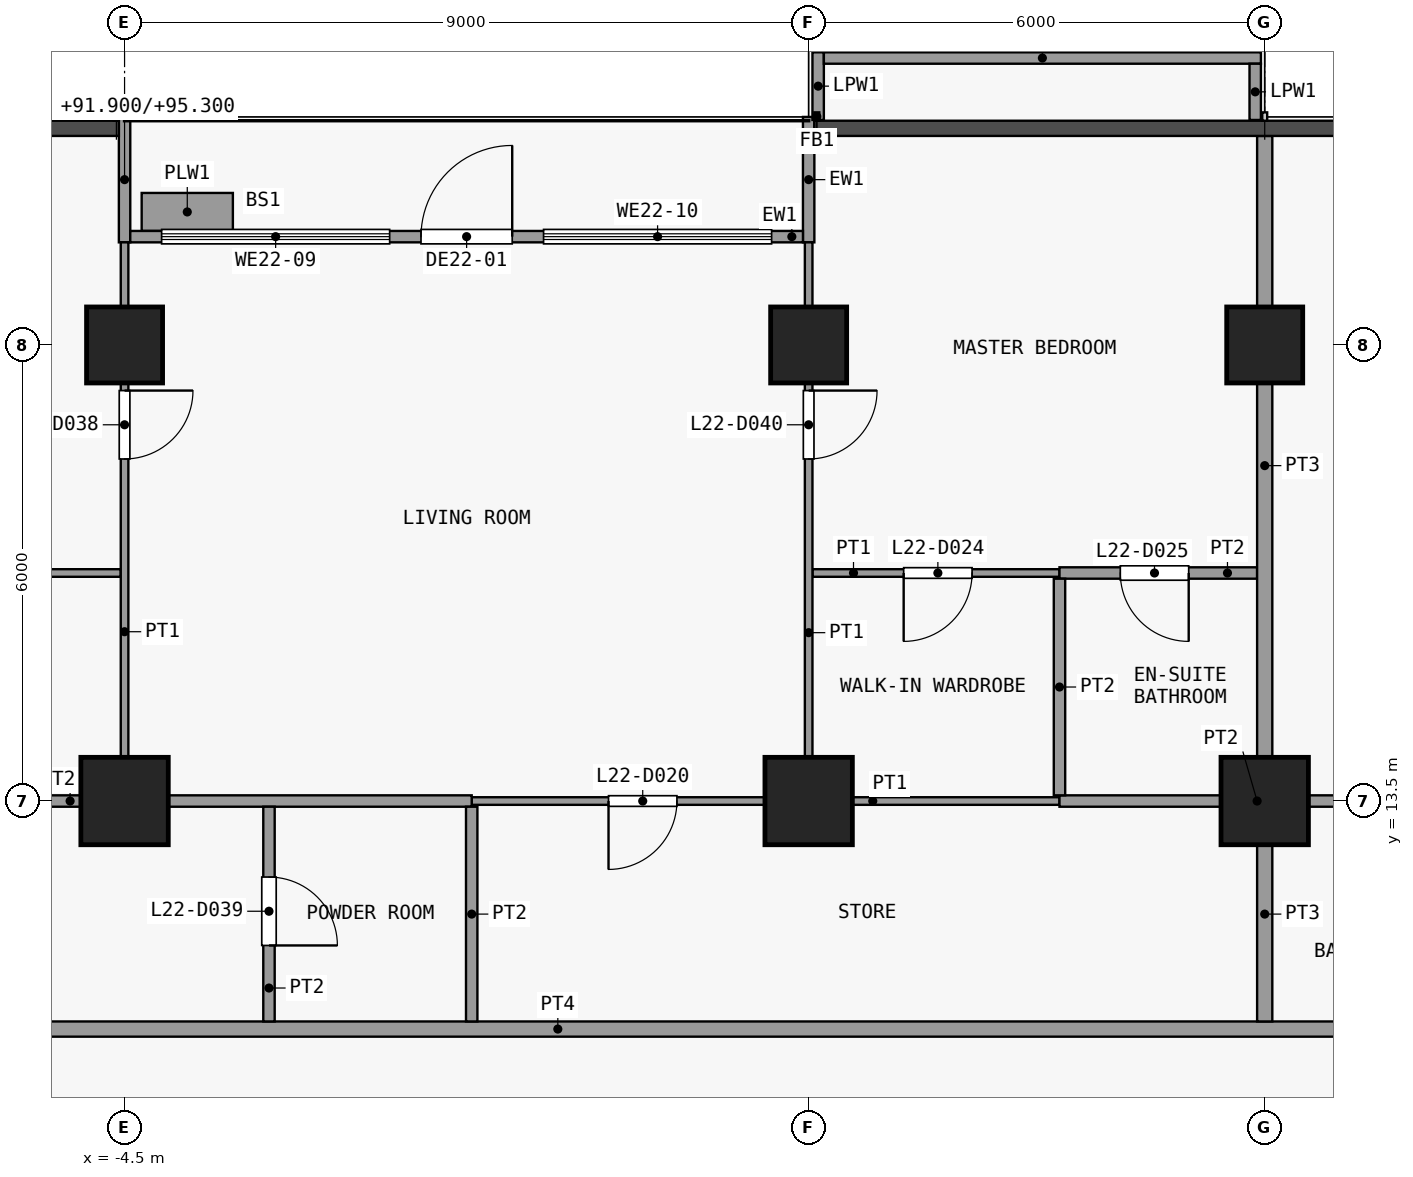
"""IFC4 building model, lengths in metres.
Left out: names, types, materials, properties, quantities, classifications, styles, units other than length and angle.
Written with IfcOpenShell. Run it as: python <this file> out.ifc"""

import sys

from ifc_helpers import new_model, si_unit, direction, frame, frame_2d, origin, origin_2d, place, context, subcontext, project, spatial, rectangle, extrude, element, fill, save


model = new_model("IFC4")
c1 = context("Model", 3, precision=1e-05, world=origin(), true_north=direction((0.0, 1.0)))
c2 = subcontext(c1, "Body", "Model", "MODEL_VIEW")
j1 = project(units=[si_unit("LENGTHUNIT", "METRE"), si_unit("PLANEANGLEUNIT", "RADIAN")], contexts=[c1])
p1 = place(None, origin())
s1 = spatial("IfcSite", under=j1, at=p1, CompositionType="ELEMENT")
p2 = place(p1, origin())
s2 = spatial("IfcBuilding", under=s1, at=p2, CompositionType="ELEMENT")
p3 = place(p2, frame((0.0, 0.0, 91.9)))
s3 = spatial("IfcBuildingStorey", under=s2, at=p3, CompositionType="ELEMENT", Elevation=91.9)
p4 = place(p3, frame((-4.5, 13.5, 0.0), z_axis=(0.0, 0.0, 1.0), x_axis=(1.0, 0.0, 0.0)))
e1 = element("IfcColumn", 1, at=p4, inside=s3, PredefinedType="COLUMN", context=c2, shape_type="SweptSolid", body=[
    extrude(rectangle(XDim=1.15, YDim=1.15, at=origin_2d()), origin(), (0.0, 0.0, 1.0), 3.6),
])
p5 = place(p3, frame((-4.5, 19.5, 0.0), z_axis=(0.0, 0.0, 1.0), x_axis=(1.0, 0.0, 0.0)))
e2 = element("IfcColumn", 2, at=p5, inside=s3, PredefinedType="COLUMN", context=c2, shape_type="SweptSolid", body=[
    extrude(rectangle(XDim=1.0, YDim=1.0, at=origin_2d()), origin(), (0.0, 0.0, 1.0), 3.6),
])
p6 = place(p3, frame((4.5, 13.5, 0.0), z_axis=(0.0, 0.0, 1.0), x_axis=(1.0, 0.0, 0.0)))
e3 = element("IfcColumn", 3, at=p6, inside=s3, PredefinedType="COLUMN", context=c2, shape_type="SweptSolid", body=[
    extrude(rectangle(XDim=1.15, YDim=1.15, at=origin_2d()), origin(), (0.0, 0.0, 1.0), 3.6),
])
p7 = place(p3, frame((4.5, 19.5, 0.0), z_axis=(0.0, 0.0, 1.0), x_axis=(1.0, 0.0, 0.0)))
e4 = element("IfcColumn", 4, at=p7, inside=s3, PredefinedType="COLUMN", context=c2, shape_type="SweptSolid", body=[
    extrude(rectangle(XDim=1.0, YDim=1.0, at=origin_2d()), origin(), (0.0, 0.0, 1.0), 3.6),
])
p8 = place(p3, frame((10.5, 13.5, 0.0), z_axis=(0.0, 0.0, 1.0), x_axis=(1.0, 0.0, 0.0)))
e5 = element("IfcColumn", 5, at=p8, inside=s3, PredefinedType="COLUMN", context=c2, shape_type="SweptSolid", body=[
    extrude(rectangle(XDim=1.15, YDim=1.15, at=origin_2d()), origin(), (0.0, 0.0, 1.0), 3.6),
])
p9 = place(p3, frame((10.5, 19.5, 0.0), z_axis=(0.0, 0.0, 1.0), x_axis=(1.0, 0.0, 0.0)))
e6 = element("IfcColumn", 6, at=p9, inside=s3, PredefinedType="COLUMN", context=c2, shape_type="SweptSolid", body=[
    extrude(rectangle(XDim=1.0, YDim=1.0, at=origin_2d()), origin(), (0.0, 0.0, 1.0), 3.6),
])
p10 = place(p3, frame((-4.5, 20.85, 0.0), z_axis=(0.0, 0.0, 1.0), x_axis=(0.0, 1.0, 0.0)))
e7 = element("IfcWall", 7, at=p10, inside=s3, PredefinedType="SOLIDWALL", context=c2, shape_type="SweptSolid", body=[
    extrude(rectangle(XDim=1.65, YDim=0.15, at=frame_2d((0.825, 0.0))), origin(), (0.0, 0.0, 1.0), 3.4),
])
p11 = place(p3, frame((4.5, 20.85, 0.0), z_axis=(0.0, 0.0, 1.0), x_axis=(0.0, 1.0, 0.0)))
e8 = element("IfcWall", 8, at=p11, inside=s3, PredefinedType="SOLIDWALL", context=c2, shape_type="SweptSolid", body=[
    extrude(rectangle(XDim=1.65, YDim=0.15, at=frame_2d((0.825, 0.0))), origin(), (0.0, 0.0, 1.0), 3.3),
])
p12 = place(p3, frame((-4.425, 20.925, 0.0), z_axis=(0.0, 0.0, 1.0), x_axis=(1.0, 0.0, 0.0)))
e9 = element("IfcWall", 9, at=p12, inside=s3, PredefinedType="SOLIDWALL", context=c2, shape_type="SweptSolid", body=[
    extrude(rectangle(XDim=8.85, YDim=0.15, at=frame_2d((4.425, 0.0))), origin(), (0.0, 0.0, 1.0), 3.3),
])
p13 = place(p12, frame((3.825, 0.0, 0.0)))
e10 = element("IfcOpeningElement", 10, at=p13, cuts=e9, PredefinedType="OPENING", context=c2, shape_type="SweptSolid", body=[
    extrude(rectangle(XDim=1.2, YDim=2.4, at=frame_2d((0.6, 1.2))), frame((0.0, 0.085, 0.0), z_axis=(0.0, -1.0, 0.0), x_axis=(1.0, 0.0, 0.0)), (0.0, 0.0, 1.0), 0.17),
])
p14 = place(p12, frame((0.413, 0.0, 0.9)))
e11 = element("IfcOpeningElement", 11, at=p14, cuts=e9, PredefinedType="OPENING", context=c2, shape_type="SweptSolid", body=[
    extrude(rectangle(XDim=3.0, YDim=2.1, at=frame_2d((1.5, 1.05))), frame((0.0, 0.085, 0.0), z_axis=(0.0, -1.0, 0.0), x_axis=(1.0, 0.0, 0.0)), (0.0, 0.0, 1.0), 0.17),
])
p15 = place(p12, frame((5.438, 0.0, 0.9)))
e12 = element("IfcOpeningElement", 12, at=p15, cuts=e9, PredefinedType="OPENING", context=c2, shape_type="SweptSolid", body=[
    extrude(rectangle(XDim=3.0, YDim=2.1, at=frame_2d((1.5, 1.05))), frame((0.0, 0.085, 0.0), z_axis=(0.0, -1.0, 0.0), x_axis=(1.0, 0.0, 0.0)), (0.0, 0.0, 1.0), 0.17),
])
p16 = place(p3, frame((-4.275, 21.25, 0.0), z_axis=(0.0, 0.0, 1.0), x_axis=(1.0, 0.0, 0.0)))
e13 = element("IfcWall", 13, at=p16, inside=s3, PredefinedType="USERDEFINED", context=c2, shape_type="SweptSolid", body=[
    extrude(rectangle(XDim=1.2, YDim=0.5, at=frame_2d((0.6, 0.0))), origin(), (0.0, 0.0, 1.0), 0.9),
])
p17 = place(p3, frame((4.625, 22.46, 0.0), z_axis=(0.0, 0.0, 1.0), x_axis=(0.0, 1.0, 0.0)))
e14 = element("IfcWall", 14, at=p17, inside=s3, PredefinedType="PARAPET", context=c2, shape_type="SweptSolid", body=[
    extrude(rectangle(XDim=0.89, YDim=0.15, at=frame_2d((0.445, 0.0))), origin(), (0.0, 0.0, 1.0), 1.15),
])
p18 = place(p3, frame((4.7, 23.275, 0.0), z_axis=(0.0, 0.0, 1.0), x_axis=(1.0, 0.0, 0.0)))
e15 = element("IfcWall", 15, at=p18, inside=s3, PredefinedType="PARAPET", context=c2, shape_type="SweptSolid", body=[
    extrude(rectangle(XDim=5.75, YDim=0.15, at=frame_2d((2.875, 0.0))), origin(), (0.0, 0.0, 1.0), 1.15),
])
p19 = place(p3, frame((10.375, 23.2, 0.0), z_axis=(0.0, 0.0, 1.0), x_axis=(0.0, -1.0, 0.0)))
e16 = element("IfcWall", 16, at=p19, inside=s3, PredefinedType="PARAPET", context=c2, shape_type="SweptSolid", body=[
    extrude(rectangle(XDim=0.74, YDim=0.15, at=frame_2d((0.37, 0.0))), origin(), (0.0, 0.0, 1.0), 1.15),
])
p20 = place(p3, frame((-26.25, 10.5, 0.0), z_axis=(0.0, 0.0, 1.0), x_axis=(1.0, 0.0, 0.0)))
e17 = element("IfcWall", 17, at=p20, inside=s3, PredefinedType="PARTITIONING", context=c2, shape_type="SweptSolid", body=[
    extrude(rectangle(XDim=50.1, YDim=0.2, at=frame_2d((25.05, 0.0))), origin(), (0.0, 0.0, 1.0), 3.3),
])
p21 = place(p20, frame((5.45, 0.0, 0.0)))
e18 = element("IfcOpeningElement", 18, at=p21, cuts=e17, PredefinedType="OPENING", context=c2, shape_type="SweptSolid", body=[
    extrude(rectangle(XDim=1.0, YDim=2.1, at=frame_2d((0.5, 1.05))), frame((0.0, 0.11, 0.0), z_axis=(0.0, -1.0, 0.0), x_axis=(1.0, 0.0, 0.0)), (0.0, 0.0, 1.0), 0.22),
])
p22 = place(p20, frame((13.95, 0.0, 0.0)))
e19 = element("IfcOpeningElement", 19, at=p22, cuts=e17, PredefinedType="OPENING", context=c2, shape_type="SweptSolid", body=[
    extrude(rectangle(XDim=1.0, YDim=2.1, at=frame_2d((0.5, 1.05))), frame((0.0, 0.11, 0.0), z_axis=(0.0, -1.0, 0.0), x_axis=(1.0, 0.0, 0.0)), (0.0, 0.0, 1.0), 0.22),
])
p23 = place(p20, frame((39.95, 0.0, 0.0)))
e20 = element("IfcOpeningElement", 20, at=p23, cuts=e17, PredefinedType="OPENING", context=c2, shape_type="SweptSolid", body=[
    extrude(rectangle(XDim=1.0, YDim=2.1, at=frame_2d((0.5, 1.05))), frame((0.0, 0.11, 0.0), z_axis=(0.0, -1.0, 0.0), x_axis=(1.0, 0.0, 0.0)), (0.0, 0.0, 1.0), 0.22),
])
p24 = place(p3, frame((0.067, 13.5, 0.0), z_axis=(0.0, 0.0, 1.0), x_axis=(1.0, 0.0, 0.0)))
e21 = element("IfcWall", 21, at=p24, inside=s3, PredefinedType="PARTITIONING", context=c2, shape_type="SweptSolid", body=[
    extrude(rectangle(XDim=7.733, YDim=0.1, at=frame_2d((3.867, 0.0))), origin(), (0.0, 0.0, 1.0), 3.3),
])
p25 = place(p24, frame((1.8, 0.0, 0.0)))
e22 = element("IfcOpeningElement", 22, at=p25, cuts=e21, PredefinedType="OPENING", context=c2, shape_type="SweptSolid", body=[
    extrude(rectangle(XDim=0.9, YDim=2.1, at=frame_2d((0.45, 1.05))), frame((0.0, 0.06, 0.0), z_axis=(0.0, -1.0, 0.0), x_axis=(1.0, 0.0, 0.0)), (0.0, 0.0, 1.0), 0.12),
])
p26 = place(p3, frame((-10.5, 13.5, 0.0), z_axis=(0.0, 0.0, 1.0), x_axis=(1.0, 0.0, 0.0)))
e23 = element("IfcWall", 23, at=p26, inside=s3, PredefinedType="PARTITIONING", context=c2, shape_type="SweptSolid", body=[
    extrude(rectangle(XDim=10.567, YDim=0.15, at=frame_2d((5.283, 0.0))), origin(), (0.0, 0.0, 1.0), 3.3),
])
p27 = place(p3, frame((7.8, 13.5, 0.0), z_axis=(0.0, 0.0, 1.0), x_axis=(1.0, 0.0, 0.0)))
e24 = element("IfcWall", 24, at=p27, inside=s3, PredefinedType="PARTITIONING", context=c2, shape_type="SweptSolid", body=[
    extrude(rectangle(XDim=5.2, YDim=0.15, at=frame_2d((2.6, 0.0))), origin(), (0.0, 0.0, 1.0), 3.3),
])
p28 = place(p3, frame((-10.45, 16.5, 0.0), z_axis=(0.0, 0.0, 1.0), x_axis=(1.0, 0.0, 0.0)))
e25 = element("IfcWall", 25, at=p28, inside=s3, PredefinedType="PARTITIONING", context=c2, shape_type="SweptSolid", body=[
    extrude(rectangle(XDim=5.9, YDim=0.1, at=frame_2d((2.95, 0.0))), origin(), (0.0, 0.0, 1.0), 3.3),
])
p29 = place(p28, frame((2.5, 0.0, 0.0)))
e26 = element("IfcOpeningElement", 26, at=p29, cuts=e25, PredefinedType="OPENING", context=c2, shape_type="SweptSolid", body=[
    extrude(rectangle(XDim=0.9, YDim=2.1, at=frame_2d((0.45, 1.05))), frame((0.0, 0.06, 0.0), z_axis=(0.0, -1.0, 0.0), x_axis=(1.0, 0.0, 0.0)), (0.0, 0.0, 1.0), 0.12),
])
p30 = place(p3, frame((4.55, 16.5, 0.0), z_axis=(0.0, 0.0, 1.0), x_axis=(1.0, 0.0, 0.0)))
e27 = element("IfcWall", 27, at=p30, inside=s3, PredefinedType="PARTITIONING", context=c2, shape_type="SweptSolid", body=[
    extrude(rectangle(XDim=3.25, YDim=0.1, at=frame_2d((1.625, 0.0))), origin(), (0.0, 0.0, 1.0), 3.3),
])
p31 = place(p30, frame((1.2, 0.0, 0.0)))
e28 = element("IfcOpeningElement", 28, at=p31, cuts=e27, PredefinedType="OPENING", context=c2, shape_type="SweptSolid", body=[
    extrude(rectangle(XDim=0.9, YDim=2.1, at=frame_2d((0.45, 1.05))), frame((0.0, 0.06, 0.0), z_axis=(0.0, -1.0, 0.0), x_axis=(1.0, 0.0, 0.0)), (0.0, 0.0, 1.0), 0.12),
])
p32 = place(p3, frame((7.8, 16.5, 0.0), z_axis=(0.0, 0.0, 1.0), x_axis=(1.0, 0.0, 0.0)))
e29 = element("IfcWall", 29, at=p32, inside=s3, PredefinedType="PARTITIONING", context=c2, shape_type="SweptSolid", body=[
    extrude(rectangle(XDim=2.6, YDim=0.15, at=frame_2d((1.3, 0.0))), origin(), (0.0, 0.0, 1.0), 3.3),
])
p33 = place(p32, frame((0.8, 0.0, 0.0)))
e30 = element("IfcOpeningElement", 30, at=p33, cuts=e29, PredefinedType="OPENING", context=c2, shape_type="SweptSolid", body=[
    extrude(rectangle(XDim=0.9, YDim=2.1, at=frame_2d((0.45, 1.05))), frame((0.0, 0.085, 0.0), z_axis=(0.0, -1.0, 0.0), x_axis=(1.0, 0.0, 0.0)), (0.0, 0.0, 1.0), 0.17),
])
p34 = place(p3, frame((-4.5, 13.575, 0.0), z_axis=(0.0, 0.0, 1.0), x_axis=(0.0, 1.0, 0.0)))
e31 = element("IfcWall", 31, at=p34, inside=s3, PredefinedType="PARTITIONING", context=c2, shape_type="SweptSolid", body=[
    extrude(rectangle(XDim=7.275, YDim=0.1, at=frame_2d((3.638, 0.0))), origin(), (0.0, 0.0, 1.0), 3.3),
])
p35 = place(p34, frame((4.425, 0.0, 0.0)))
e32 = element("IfcOpeningElement", 32, at=p35, cuts=e31, PredefinedType="OPENING", context=c2, shape_type="SweptSolid", body=[
    extrude(rectangle(XDim=0.9, YDim=2.1, at=frame_2d((0.45, 1.05))), frame((0.0, 0.06, 0.0), z_axis=(0.0, -1.0, 0.0), x_axis=(1.0, 0.0, 0.0)), (0.0, 0.0, 1.0), 0.12),
])
p36 = place(p3, frame((-2.6, 10.6, 0.0), z_axis=(0.0, 0.0, 1.0), x_axis=(0.0, 1.0, 0.0)))
e33 = element("IfcWall", 33, at=p36, inside=s3, PredefinedType="PARTITIONING", context=c2, shape_type="SweptSolid", body=[
    extrude(rectangle(XDim=2.825, YDim=0.15, at=frame_2d((1.413, 0.0))), origin(), (0.0, 0.0, 1.0), 3.3),
])
p37 = place(p36, frame((1.0, 0.0, 0.0)))
e34 = element("IfcOpeningElement", 34, at=p37, cuts=e33, PredefinedType="OPENING", context=c2, shape_type="SweptSolid", body=[
    extrude(rectangle(XDim=0.9, YDim=2.1, at=frame_2d((0.45, 1.05))), frame((0.0, 0.085, 0.0), z_axis=(0.0, -1.0, 0.0), x_axis=(1.0, 0.0, 0.0)), (0.0, 0.0, 1.0), 0.17),
])
p38 = place(p3, frame((0.067, 10.6, 0.0), z_axis=(0.0, 0.0, 1.0), x_axis=(0.0, 1.0, 0.0)))
e35 = element("IfcWall", 35, at=p38, inside=s3, PredefinedType="PARTITIONING", context=c2, shape_type="SweptSolid", body=[
    extrude(rectangle(XDim=2.825, YDim=0.15, at=frame_2d((1.413, 0.0))), origin(), (0.0, 0.0, 1.0), 3.3),
])
p39 = place(p3, frame((4.5, 13.55, 0.0), z_axis=(0.0, 0.0, 1.0), x_axis=(0.0, 1.0, 0.0)))
e36 = element("IfcWall", 36, at=p39, inside=s3, PredefinedType="PARTITIONING", context=c2, shape_type="SweptSolid", body=[
    extrude(rectangle(XDim=7.3, YDim=0.1, at=frame_2d((3.65, 0.0))), origin(), (0.0, 0.0, 1.0), 3.3),
])
p40 = place(p39, frame((4.45, 0.0, 0.0)))
e37 = element("IfcOpeningElement", 37, at=p40, cuts=e36, PredefinedType="OPENING", context=c2, shape_type="SweptSolid", body=[
    extrude(rectangle(XDim=0.9, YDim=2.1, at=frame_2d((0.45, 1.05))), frame((0.0, 0.06, 0.0), z_axis=(0.0, -1.0, 0.0), x_axis=(1.0, 0.0, 0.0)), (0.0, 0.0, 1.0), 0.12),
])
p41 = place(p3, frame((7.8, 13.575, 0.0), z_axis=(0.0, 0.0, 1.0), x_axis=(0.0, 1.0, 0.0)))
e38 = element("IfcWall", 38, at=p41, inside=s3, PredefinedType="PARTITIONING", context=c2, shape_type="SweptSolid", body=[
    extrude(rectangle(XDim=2.85, YDim=0.15, at=frame_2d((1.425, 0.0))), origin(), (0.0, 0.0, 1.0), 3.3),
])
p42 = place(p3, frame((10.5, 10.6, 0.0), z_axis=(0.0, 0.0, 1.0), x_axis=(0.0, 1.0, 0.0)))
e39 = element("IfcWall", 39, at=p42, inside=s3, PredefinedType="PARTITIONING", context=c2, shape_type="SweptSolid", body=[
    extrude(rectangle(XDim=2.825, YDim=0.2, at=frame_2d((1.413, 0.0))), origin(), (0.0, 0.0, 1.0), 3.3),
])
p43 = place(p3, frame((10.5, 13.575, 0.0), z_axis=(0.0, 0.0, 1.0), x_axis=(0.0, 1.0, 0.0)))
e40 = element("IfcWall", 40, at=p43, inside=s3, PredefinedType="PARTITIONING", context=c2, shape_type="SweptSolid", body=[
    extrude(rectangle(XDim=8.675, YDim=0.2, at=frame_2d((4.337, 0.0))), origin(), (0.0, 0.0, 1.0), 3.3),
])
p44 = place(p13, origin())
e41 = element("IfcDoor", 41, at=p44, inside=s3, OperationType="SINGLE_SWING_RIGHT", PredefinedType="DOOR", context=c2, shape_type="SweptSolid", body=[
    extrude(rectangle(XDim=1.2, YDim=2.4, at=frame_2d((0.6, 1.2))), frame((0.0, 0.025, 0.0), z_axis=(0.0, -1.0, 0.0), x_axis=(1.0, 0.0, 0.0)), (0.0, 0.0, 1.0), 0.05),
])
fill(e10, e41)
p45 = place(p14, origin())
e42 = element("IfcWindow", 42, at=p45, inside=s3, PartitioningType="SINGLE_PANEL", PredefinedType="WINDOW", context=c2, shape_type="SweptSolid", body=[
    extrude(rectangle(XDim=3.0, YDim=2.1, at=frame_2d((1.5, 1.05))), frame((0.0, 0.03, 0.0), z_axis=(0.0, -1.0, 0.0), x_axis=(1.0, 0.0, 0.0)), (0.0, 0.0, 1.0), 0.06),
])
fill(e11, e42)
p46 = place(p15, origin())
e43 = element("IfcWindow", 43, at=p46, inside=s3, PartitioningType="SINGLE_PANEL", PredefinedType="WINDOW", context=c2, shape_type="SweptSolid", body=[
    extrude(rectangle(XDim=3.0, YDim=2.1, at=frame_2d((1.5, 1.05))), frame((0.0, 0.03, 0.0), z_axis=(0.0, -1.0, 0.0), x_axis=(1.0, 0.0, 0.0)), (0.0, 0.0, 1.0), 0.06),
])
fill(e12, e43)
p47 = place(p25, origin())
e44 = element("IfcDoor", 44, at=p47, inside=s3, OperationType="SINGLE_SWING_LEFT", PredefinedType="DOOR", context=c2, shape_type="SweptSolid", body=[
    extrude(rectangle(XDim=0.9, YDim=2.1, at=frame_2d((0.45, 1.05))), frame((0.0, 0.025, 0.0), z_axis=(0.0, -1.0, 0.0), x_axis=(1.0, 0.0, 0.0)), (0.0, 0.0, 1.0), 0.05),
])
fill(e22, e44)
p48 = place(p31, origin())
e45 = element("IfcDoor", 45, at=p48, inside=s3, OperationType="SINGLE_SWING_LEFT", PredefinedType="DOOR", context=c2, shape_type="SweptSolid", body=[
    extrude(rectangle(XDim=0.9, YDim=2.1, at=frame_2d((0.45, 1.05))), frame((0.0, 0.025, 0.0), z_axis=(0.0, -1.0, 0.0), x_axis=(1.0, 0.0, 0.0)), (0.0, 0.0, 1.0), 0.05),
])
fill(e28, e45)
p49 = place(p33, origin())
e46 = element("IfcDoor", 46, at=p49, inside=s3, OperationType="SINGLE_SWING_RIGHT", PredefinedType="DOOR", context=c2, shape_type="SweptSolid", body=[
    extrude(rectangle(XDim=0.9, YDim=2.1, at=frame_2d((0.45, 1.05))), frame((0.0, 0.025, 0.0), z_axis=(0.0, -1.0, 0.0), x_axis=(1.0, 0.0, 0.0)), (0.0, 0.0, 1.0), 0.05),
])
fill(e30, e46)
p50 = place(p35, origin())
e47 = element("IfcDoor", 47, at=p50, inside=s3, OperationType="SINGLE_SWING_RIGHT", PredefinedType="DOOR", context=c2, shape_type="SweptSolid", body=[
    extrude(rectangle(XDim=0.9, YDim=2.1, at=frame_2d((0.45, 1.05))), frame((0.0, 0.025, 0.0), z_axis=(0.0, -1.0, 0.0), x_axis=(1.0, 0.0, 0.0)), (0.0, 0.0, 1.0), 0.05),
])
fill(e32, e47)
p51 = place(p37, origin())
e48 = element("IfcDoor", 48, at=p51, inside=s3, OperationType="SINGLE_SWING_LEFT", PredefinedType="DOOR", context=c2, shape_type="SweptSolid", body=[
    extrude(rectangle(XDim=0.9, YDim=2.1, at=frame_2d((0.45, 1.05))), frame((0.0, 0.025, 0.0), z_axis=(0.0, -1.0, 0.0), x_axis=(1.0, 0.0, 0.0)), (0.0, 0.0, 1.0), 0.05),
])
fill(e34, e48)
p52 = place(p40, origin())
e49 = element("IfcDoor", 49, at=p52, inside=s3, OperationType="SINGLE_SWING_RIGHT", PredefinedType="DOOR", context=c2, shape_type="SweptSolid", body=[
    extrude(rectangle(XDim=0.9, YDim=2.1, at=frame_2d((0.45, 1.05))), frame((0.0, 0.025, 0.0), z_axis=(0.0, -1.0, 0.0), x_axis=(1.0, 0.0, 0.0)), (0.0, 0.0, 1.0), 0.05),
])
fill(e37, e49)
save(model, sys.argv[1])
